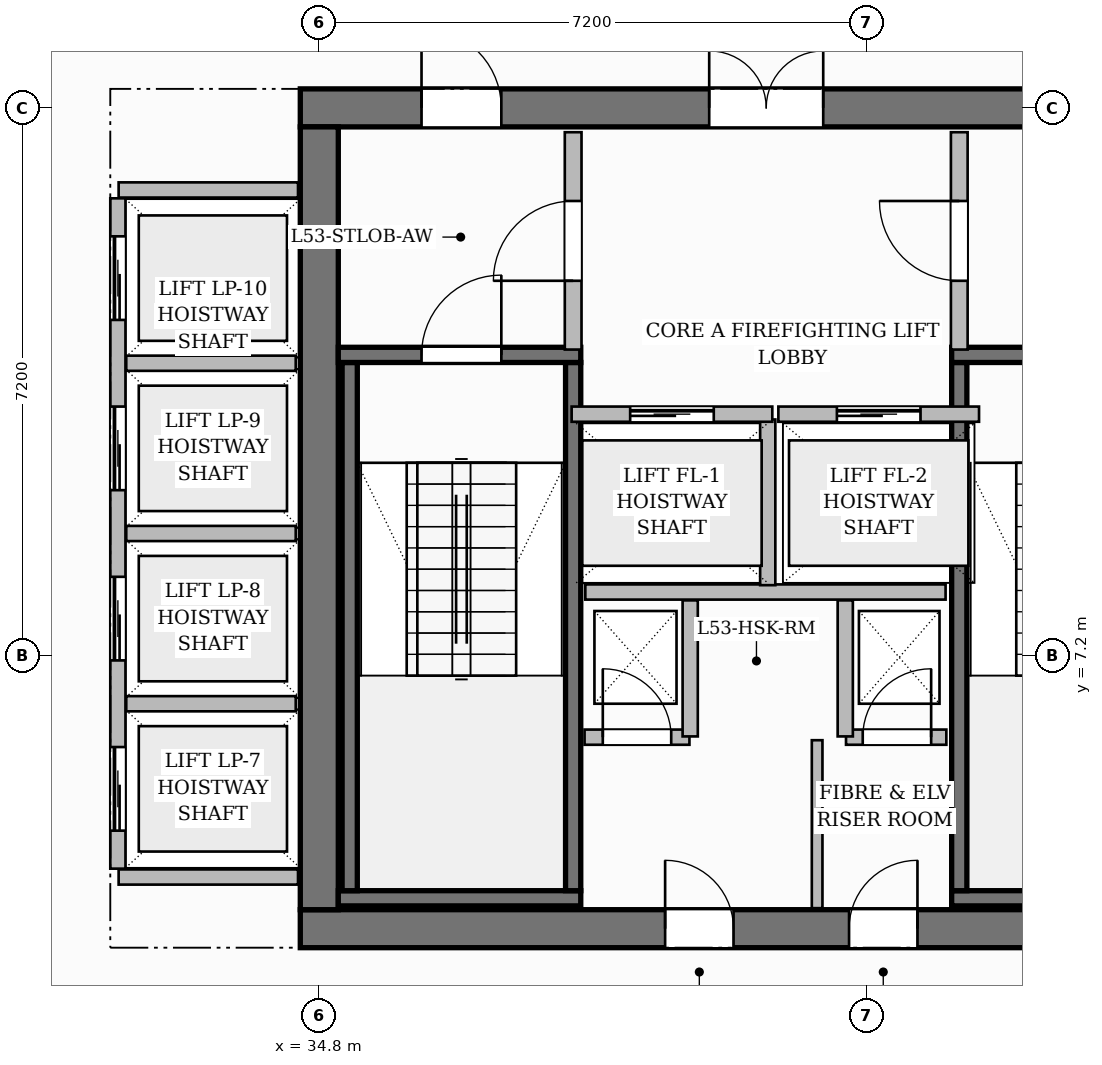
"""IFC4 building model, lengths in metres.
Left out: names, types, materials, properties, quantities, classifications, styles, units other than length and angle.
Written with IfcOpenShell. Run it as: python <this file> out.ifc"""

import sys

from ifc_helpers import new_model, si_unit, direction, frame, frame_2d, origin, place, context, subcontext, project, spatial, rectangle, extrude, source, transform, mapped, element, fill, save


model = new_model("IFC4")
c1 = context("Model", 3, precision=1e-05, world=origin(), true_north=direction((0.0, 1.0)))
c2 = subcontext(c1, "Body", "Model", "MODEL_VIEW")
j1 = project(units=[si_unit("LENGTHUNIT", "METRE"), si_unit("PLANEANGLEUNIT", "RADIAN")], contexts=[c1])
p1 = place(None, origin())
s1 = spatial("IfcSite", under=j1, at=p1, CompositionType="ELEMENT")
p2 = place(p1, origin())
s2 = spatial("IfcBuilding", under=s1, at=p2, CompositionType="ELEMENT")
p3 = place(p2, frame((0.0, 0.0, 213.45)))
s3 = spatial("IfcBuildingStorey", under=s2, at=p3, CompositionType="ELEMENT", Elevation=213.45)
p4 = place(p3, frame((34.55, 3.6, 0.0), z_axis=(0.0, 0.0, 1.0), x_axis=(1.0, 0.0, 0.0)))
e1 = element("IfcWall", 1, at=p4, inside=s3, PredefinedType="SHEAR", context=c2, shape_type="SweptSolid", body=[
    extrude(rectangle(XDim=15.5, YDim=0.5, at=frame_2d((7.75, 0.0))), origin(), (0.0, 0.0, 1.0), 3.85),
])
p5 = place(p4, frame((4.8, 0.0, 0.0)))
e2 = element("IfcOpeningElement", 2, at=p5, cuts=e1, PredefinedType="OPENING", context=c2, shape_type="SweptSolid", body=[
    extrude(rectangle(XDim=0.9, YDim=2.1, at=frame_2d((0.45, 1.05))), frame((0.0, 0.26, 0.0), z_axis=(0.0, -1.0, 0.0), x_axis=(1.0, 0.0, 0.0)), (0.0, 0.0, 1.0), 0.52),
])
p6 = place(p4, frame((7.22, 0.0, 0.0)))
e3 = element("IfcOpeningElement", 3, at=p6, cuts=e1, PredefinedType="OPENING", context=c2, shape_type="SweptSolid", body=[
    extrude(rectangle(XDim=0.9, YDim=2.1, at=frame_2d((0.45, 1.05))), frame((0.0, 0.26, 0.0), z_axis=(0.0, -1.0, 0.0), x_axis=(1.0, 0.0, 0.0)), (0.0, 0.0, 1.0), 0.52),
])
p7 = place(p3, frame((34.55, 14.4, 0.0), z_axis=(0.0, 0.0, 1.0), x_axis=(1.0, 0.0, 0.0)))
e4 = element("IfcWall", 4, at=p7, inside=s3, PredefinedType="SHEAR", context=c2, shape_type="SweptSolid", body=[
    extrude(rectangle(XDim=15.5, YDim=0.5, at=frame_2d((7.75, 0.0))), origin(), (0.0, 0.0, 1.0), 3.85),
])
p8 = place(p7, frame((5.38, 0.0, 0.0)))
e5 = element("IfcOpeningElement", 5, at=p8, cuts=e4, PredefinedType="OPENING", context=c2, shape_type="SweptSolid", body=[
    extrude(rectangle(XDim=1.5, YDim=2.2, at=frame_2d((0.75, 1.1))), frame((0.0, 0.26, 0.0), z_axis=(0.0, -1.0, 0.0), x_axis=(1.0, 0.0, 0.0)), (0.0, 0.0, 1.0), 0.52),
])
p9 = place(p7, frame((1.595, 0.0, 0.0)))
e6 = element("IfcOpeningElement", 6, at=p9, cuts=e4, PredefinedType="OPENING", context=c2, shape_type="SweptSolid", body=[
    extrude(rectangle(XDim=1.05, YDim=2.15, at=frame_2d((0.525, 1.075))), frame((0.0, 0.26, 0.0), z_axis=(0.0, -1.0, 0.0), x_axis=(1.0, 0.0, 0.0)), (0.0, 0.0, 1.0), 0.52),
])
p10 = place(p7, frame((11.225, 0.0, 0.0)))
e7 = element("IfcOpeningElement", 7, at=p10, cuts=e4, PredefinedType="OPENING", context=c2, shape_type="SweptSolid", body=[
    extrude(rectangle(XDim=1.05, YDim=2.15, at=frame_2d((0.525, 1.075))), frame((0.0, 0.26, 0.0), z_axis=(0.0, -1.0, 0.0), x_axis=(1.0, 0.0, 0.0)), (0.0, 0.0, 1.0), 0.52),
])
p11 = place(p3, frame((34.8, 3.85, 0.0), z_axis=(0.0, 0.0, 1.0), x_axis=(0.0, 1.0, 0.0)))
e8 = element("IfcWall", 8, at=p11, inside=s3, PredefinedType="SHEAR", context=c2, shape_type="SweptSolid", body=[
    extrude(rectangle(XDim=10.3, YDim=0.5, at=frame_2d((5.15, 0.0))), origin(), (0.0, 0.0, 1.0), 3.85),
])
p12 = place(p3, frame((35.05, 4.0, 0.0), z_axis=(0.0, 0.0, 1.0), x_axis=(1.0, 0.0, 0.0)))
e9 = element("IfcWall", 9, at=p12, inside=s3, PredefinedType="SHEAR", context=c2, shape_type="SweptSolid", body=[
    extrude(rectangle(XDim=3.19, YDim=0.2, at=frame_2d((1.595, 0.0))), origin(), (0.0, 0.0, 1.0), 3.85),
])
for number, where, z_axis, x_axis in (
    (10, (35.2, 4.1, 0.0), (0.0, 0.0, 1.0), (0.0, 1.0, 0.0)),
    (11, (38.14, 4.1, 0.0), (0.0, 0.0, 1.0), (0.0, 1.0, 0.0)),
):
    element("IfcWall", number, at=place(p3, frame(where, z_axis=z_axis, x_axis=x_axis)), inside=s3, PredefinedType="SHEAR", context=c2, shape_type="SweptSolid", body=[
        extrude(rectangle(XDim=6.95, YDim=0.2, at=frame_2d((3.475, 0.0))), origin(), (0.0, 0.0, 1.0), 3.85),
    ])
p13 = place(p3, frame((35.05, 11.15, 0.0), z_axis=(0.0, 0.0, 1.0), x_axis=(1.0, 0.0, 0.0)))
e12 = element("IfcWall", 12, at=p13, inside=s3, PredefinedType="SHEAR", context=c2, shape_type="SweptSolid", body=[
    extrude(rectangle(XDim=3.19, YDim=0.2, at=frame_2d((1.595, 0.0))), origin(), (0.0, 0.0, 1.0), 3.85),
])
p14 = place(p13, frame((1.095, 0.0, 0.0)))
e13 = element("IfcOpeningElement", 13, at=p14, cuts=e12, PredefinedType="OPENING", context=c2, shape_type="SweptSolid", body=[
    extrude(rectangle(XDim=1.05, YDim=2.2, at=frame_2d((0.525, 1.1))), frame((0.0, 0.11, 0.0), z_axis=(0.0, -1.0, 0.0), x_axis=(1.0, 0.0, 0.0)), (0.0, 0.0, 1.0), 0.22),
])
p15 = place(p3, frame((43.12, 4.0, 0.0), z_axis=(0.0, 0.0, 1.0), x_axis=(1.0, 0.0, 0.0)))
e14 = element("IfcWall", 14, at=p15, inside=s3, PredefinedType="SHEAR", context=c2, shape_type="SweptSolid", body=[
    extrude(rectangle(XDim=6.43, YDim=0.2, at=frame_2d((3.215, 0.0))), origin(), (0.0, 0.0, 1.0), 3.85),
])
p16 = place(p3, frame((43.22, 4.1, 0.0), z_axis=(0.0, 0.0, 1.0), x_axis=(0.0, 1.0, 0.0)))
e15 = element("IfcWall", 15, at=p16, inside=s3, PredefinedType="SHEAR", context=c2, shape_type="SweptSolid", body=[
    extrude(rectangle(XDim=6.95, YDim=0.2, at=frame_2d((3.475, 0.0))), origin(), (0.0, 0.0, 1.0), 3.85),
])
p17 = place(p3, frame((43.12, 11.15, 0.0), z_axis=(0.0, 0.0, 1.0), x_axis=(1.0, 0.0, 0.0)))
e16 = element("IfcWall", 16, at=p17, inside=s3, PredefinedType="SHEAR", context=c2, shape_type="SweptSolid", body=[
    extrude(rectangle(XDim=6.43, YDim=0.2, at=frame_2d((3.215, 0.0))), origin(), (0.0, 0.0, 1.0), 3.85),
])
p18 = place(p17, frame((1.045, 0.0, 0.0)))
e17 = element("IfcOpeningElement", 17, at=p18, cuts=e16, PredefinedType="OPENING", context=c2, shape_type="SweptSolid", body=[
    extrude(rectangle(XDim=1.05, YDim=2.2, at=frame_2d((0.525, 1.1))), frame((0.0, 0.11, 0.0), z_axis=(0.0, -1.0, 0.0), x_axis=(1.0, 0.0, 0.0)), (0.0, 0.0, 1.0), 0.22),
])
p19 = place(p17, frame((4.125, 0.0, 0.0)))
e18 = element("IfcOpeningElement", 18, at=p19, cuts=e16, PredefinedType="OPENING", context=c2, shape_type="SweptSolid", body=[
    extrude(rectangle(XDim=1.05, YDim=2.2, at=frame_2d((0.525, 1.1))), frame((0.0, 0.11, 0.0), z_axis=(0.0, -1.0, 0.0), x_axis=(1.0, 0.0, 0.0)), (0.0, 0.0, 1.0), 0.22),
])
p20 = place(p3, frame((38.3, 8.03, 0.0), z_axis=(0.0, 0.0, 1.0), x_axis=(1.0, 0.0, 0.0)))
e19 = element("IfcWall", 19, at=p20, inside=s3, PredefinedType="PARTITIONING", context=c2, shape_type="SweptSolid", body=[
    extrude(rectangle(XDim=4.74, YDim=0.2, at=frame_2d((2.37, 0.0))), origin(), (0.0, 0.0, 1.0), 3.6),
])
p21 = place(p3, frame((40.7, 8.12, 0.0), z_axis=(0.0, 0.0, 1.0), x_axis=(0.0, 1.0, 0.0)))
e20 = element("IfcWall", 20, at=p21, inside=s3, PredefinedType="PARTITIONING", context=c2, shape_type="SweptSolid", body=[
    extrude(rectangle(XDim=2.18, YDim=0.2, at=frame_2d((1.09, 0.0))), origin(), (0.0, 0.0, 1.0), 3.6),
])
p22 = place(p3, frame((38.14, 11.22, 0.0), z_axis=(0.0, 0.0, 1.0), x_axis=(0.0, 1.0, 0.0)))
e21 = element("IfcWall", 21, at=p22, inside=s3, PredefinedType="PARTITIONING", context=c2, shape_type="SweptSolid", body=[
    extrude(rectangle(XDim=2.86, YDim=0.22, at=frame_2d((1.43, 0.0))), origin(), (0.0, 0.0, 1.0), 3.6),
])
p23 = place(p22, frame((0.905, 0.0, 0.0)))
e22 = element("IfcOpeningElement", 22, at=p23, cuts=e21, PredefinedType="OPENING", context=c2, shape_type="SweptSolid", body=[
    extrude(rectangle(XDim=1.05, YDim=2.15, at=frame_2d((0.525, 1.075))), frame((0.0, 0.12, 0.0), z_axis=(0.0, -1.0, 0.0), x_axis=(1.0, 0.0, 0.0)), (0.0, 0.0, 1.0), 0.24),
])
p24 = place(p3, frame((43.22, 11.22, 0.0), z_axis=(0.0, 0.0, 1.0), x_axis=(0.0, 1.0, 0.0)))
e23 = element("IfcWall", 23, at=p24, inside=s3, PredefinedType="PARTITIONING", context=c2, shape_type="SweptSolid", body=[
    extrude(rectangle(XDim=2.86, YDim=0.22, at=frame_2d((1.43, 0.0))), origin(), (0.0, 0.0, 1.0), 3.6),
])
p25 = place(p24, frame((0.905, 0.0, 0.0)))
e24 = element("IfcOpeningElement", 24, at=p25, cuts=e23, PredefinedType="OPENING", context=c2, shape_type="SweptSolid", body=[
    extrude(rectangle(XDim=1.05, YDim=2.15, at=frame_2d((0.525, 1.075))), frame((0.0, 0.12, 0.0), z_axis=(0.0, -1.0, 0.0), x_axis=(1.0, 0.0, 0.0)), (0.0, 0.0, 1.0), 0.24),
])
p26 = place(p3, frame((38.29, 6.12, 0.0), z_axis=(0.0, 0.0, 1.0), x_axis=(1.0, 0.0, 0.0)))
e25 = element("IfcWall", 25, at=p26, inside=s3, PredefinedType="PARTITIONING", context=c2, shape_type="SweptSolid", body=[
    extrude(rectangle(XDim=1.38, YDim=0.2, at=frame_2d((0.69, 0.0))), origin(), (0.0, 0.0, 1.0), 3.6),
])
p27 = place(p26, frame((0.24, 0.0, 0.0)))
e26 = element("IfcOpeningElement", 26, at=p27, cuts=e25, PredefinedType="OPENING", context=c2, shape_type="SweptSolid", body=[
    extrude(rectangle(XDim=0.9, YDim=2.1, at=frame_2d((0.45, 1.05))), frame((0.0, 0.11, 0.0), z_axis=(0.0, -1.0, 0.0), x_axis=(1.0, 0.0, 0.0)), (0.0, 0.0, 1.0), 0.22),
])
p28 = place(p3, frame((39.68, 6.13, 0.0), z_axis=(0.0, 0.0, 1.0), x_axis=(0.0, 1.0, 0.0)))
e27 = element("IfcWall", 27, at=p28, inside=s3, PredefinedType="PARTITIONING", context=c2, shape_type="SweptSolid", body=[
    extrude(rectangle(XDim=1.79, YDim=0.2, at=frame_2d((0.895, 0.0))), origin(), (0.0, 0.0, 1.0), 3.6),
])
p29 = place(p3, frame((41.73, 6.12, 0.0), z_axis=(0.0, 0.0, 1.0), x_axis=(1.0, 0.0, 0.0)))
e28 = element("IfcWall", 28, at=p29, inside=s3, PredefinedType="PARTITIONING", context=c2, shape_type="SweptSolid", body=[
    extrude(rectangle(XDim=1.32, YDim=0.2, at=frame_2d((0.66, 0.0))), origin(), (0.0, 0.0, 1.0), 3.6),
])
p30 = place(p29, frame((0.22, 0.0, 0.0)))
e29 = element("IfcOpeningElement", 29, at=p30, cuts=e28, PredefinedType="OPENING", context=c2, shape_type="SweptSolid", body=[
    extrude(rectangle(XDim=0.9, YDim=2.1, at=frame_2d((0.45, 1.05))), frame((0.0, 0.11, 0.0), z_axis=(0.0, -1.0, 0.0), x_axis=(1.0, 0.0, 0.0)), (0.0, 0.0, 1.0), 0.22),
])
p31 = place(p3, frame((41.72, 6.13, 0.0), z_axis=(0.0, 0.0, 1.0), x_axis=(0.0, 1.0, 0.0)))
e30 = element("IfcWall", 30, at=p31, inside=s3, PredefinedType="PARTITIONING", context=c2, shape_type="SweptSolid", body=[
    extrude(rectangle(XDim=1.79, YDim=0.2, at=frame_2d((0.895, 0.0))), origin(), (0.0, 0.0, 1.0), 3.6),
])
p32 = place(p3, frame((41.35, 3.87, 0.0), z_axis=(0.0, 0.0, 1.0), x_axis=(0.0, 1.0, 0.0)))
e31 = element("IfcWall", 31, at=p32, inside=s3, PredefinedType="PARTITIONING", context=c2, shape_type="SweptSolid", body=[
    extrude(rectangle(XDim=2.21, YDim=0.14, at=frame_2d((1.105, 0.0))), origin(), (0.0, 0.0, 1.0), 3.6),
])
for number, where, z_axis, x_axis in (
    (32, (32.16, 4.28, 0.0), (0.0, 0.0, 1.0), (1.0, 0.0, 0.0)),
    (33, (32.16, 13.32, 0.0), (0.0, 0.0, 1.0), (1.0, 0.0, 0.0)),
):
    element("IfcWall", number, at=place(p3, frame(where, z_axis=z_axis, x_axis=x_axis)), inside=s3, PredefinedType="PARTITIONING", context=c2, shape_type="SweptSolid", body=[
        extrude(rectangle(XDim=2.36, YDim=0.2, at=frame_2d((1.18, 0.0))), origin(), (0.0, 0.0, 1.0), 3.6),
    ])
p33 = place(p3, frame((32.15, 4.39, 0.0), z_axis=(0.0, 0.0, 1.0), x_axis=(0.0, 1.0, 0.0)))
e34 = element("IfcWall", 34, at=p33, inside=s3, PredefinedType="PARTITIONING", context=c2, shape_type="SweptSolid", body=[
    extrude(rectangle(XDim=8.82, YDim=0.2, at=frame_2d((4.41, 0.0))), origin(), (0.0, 0.0, 1.0), 3.6),
])
p34 = place(p33, frame((0.5, 0.0, 0.0)))
e35 = element("IfcOpeningElement", 35, at=p34, cuts=e34, PredefinedType="OPENING", context=c2, shape_type="SweptSolid", body=[
    extrude(rectangle(XDim=1.1, YDim=2.2, at=frame_2d((0.55, 1.1))), frame((0.0, 0.11, 0.0), z_axis=(0.0, -1.0, 0.0), x_axis=(1.0, 0.0, 0.0)), (0.0, 0.0, 1.0), 0.22),
])
p35 = place(p33, frame((2.74, 0.0, 0.0)))
e36 = element("IfcOpeningElement", 36, at=p35, cuts=e34, PredefinedType="OPENING", context=c2, shape_type="SweptSolid", body=[
    extrude(rectangle(XDim=1.1, YDim=2.2, at=frame_2d((0.55, 1.1))), frame((0.0, 0.11, 0.0), z_axis=(0.0, -1.0, 0.0), x_axis=(1.0, 0.0, 0.0)), (0.0, 0.0, 1.0), 0.22),
])
p36 = place(p33, frame((4.98, 0.0, 0.0)))
e37 = element("IfcOpeningElement", 37, at=p36, cuts=e34, PredefinedType="OPENING", context=c2, shape_type="SweptSolid", body=[
    extrude(rectangle(XDim=1.1, YDim=2.2, at=frame_2d((0.55, 1.1))), frame((0.0, 0.11, 0.0), z_axis=(0.0, -1.0, 0.0), x_axis=(1.0, 0.0, 0.0)), (0.0, 0.0, 1.0), 0.22),
])
p37 = place(p33, frame((7.22, 0.0, 0.0)))
e38 = element("IfcOpeningElement", 38, at=p37, cuts=e34, PredefinedType="OPENING", context=c2, shape_type="SweptSolid", body=[
    extrude(rectangle(XDim=1.1, YDim=2.2, at=frame_2d((0.55, 1.1))), frame((0.0, 0.11, 0.0), z_axis=(0.0, -1.0, 0.0), x_axis=(1.0, 0.0, 0.0)), (0.0, 0.0, 1.0), 0.22),
])
for number, where, z_axis, x_axis in (
    (39, (32.26, 6.56, 0.0), (0.0, 0.0, 1.0), (1.0, 0.0, 0.0)),
    (40, (32.26, 8.8, 0.0), (0.0, 0.0, 1.0), (1.0, 0.0, 0.0)),
    (41, (32.26, 11.04, 0.0), (0.0, 0.0, 1.0), (1.0, 0.0, 0.0)),
):
    element("IfcWall", number, at=place(p3, frame(where, z_axis=z_axis, x_axis=x_axis)), inside=s3, PredefinedType="PARTITIONING", context=c2, shape_type="SweptSolid", body=[
        extrude(rectangle(XDim=2.23, YDim=0.2, at=frame_2d((1.115, 0.0))), origin(), (0.0, 0.0, 1.0), 3.6),
    ])
p38 = place(p3, frame((38.12, 10.37, 0.0), z_axis=(0.0, 0.0, 1.0), x_axis=(1.0, 0.0, 0.0)))
e42 = element("IfcWall", 42, at=p38, inside=s3, PredefinedType="PARTITIONING", context=c2, shape_type="SweptSolid", body=[
    extrude(rectangle(XDim=2.64, YDim=0.2, at=frame_2d((1.32, 0.0))), origin(), (0.0, 0.0, 1.0), 3.6),
])
p39 = place(p38, frame((0.77, 0.0, 0.0)))
e43 = element("IfcOpeningElement", 43, at=p39, cuts=e42, PredefinedType="OPENING", context=c2, shape_type="SweptSolid", body=[
    extrude(rectangle(XDim=1.1, YDim=2.2, at=frame_2d((0.55, 1.1))), frame((0.0, 0.11, 0.0), z_axis=(0.0, -1.0, 0.0), x_axis=(1.0, 0.0, 0.0)), (0.0, 0.0, 1.0), 0.22),
])
p40 = place(p3, frame((40.84, 10.37, 0.0), z_axis=(0.0, 0.0, 1.0), x_axis=(1.0, 0.0, 0.0)))
e44 = element("IfcWall", 44, at=p40, inside=s3, PredefinedType="PARTITIONING", context=c2, shape_type="SweptSolid", body=[
    extrude(rectangle(XDim=2.64, YDim=0.2, at=frame_2d((1.32, 0.0))), origin(), (0.0, 0.0, 1.0), 3.6),
])
p41 = place(p40, frame((0.77, 0.0, 0.0)))
e45 = element("IfcOpeningElement", 45, at=p41, cuts=e44, PredefinedType="OPENING", context=c2, shape_type="SweptSolid", body=[
    extrude(rectangle(XDim=1.1, YDim=2.2, at=frame_2d((0.55, 1.1))), frame((0.0, 0.11, 0.0), z_axis=(0.0, -1.0, 0.0), x_axis=(1.0, 0.0, 0.0)), (0.0, 0.0, 1.0), 0.22),
])
m1 = source(origin(), c2, "Body", "SweptSolid", [
    extrude(rectangle(XDim=1.05, YDim=2.2, at=frame_2d((0.525, 1.1))), frame((0.0, 0.025, 0.0), z_axis=(0.0, -1.0, 0.0), x_axis=(1.0, 0.0, 0.0)), (0.0, 0.0, 1.0), 0.05),
])
p42 = place(p14, origin())
e46 = element("IfcDoor", 46, at=p42, inside=s3, OperationType="SINGLE_SWING_RIGHT", PredefinedType="DOOR", context=c2, shape_type="MappedRepresentation", body=[
    mapped(m1, transform((0.0, 0.0, 0.0), scale=1.0)),
])
fill(e13, e46)
m2 = source(origin(), c2, "Body", "SweptSolid", [
    extrude(rectangle(XDim=1.05, YDim=2.15, at=frame_2d((0.525, 1.075))), frame((0.0, 0.025, 0.0), z_axis=(0.0, -1.0, 0.0), x_axis=(1.0, 0.0, 0.0)), (0.0, 0.0, 1.0), 0.05),
])
p43 = place(p23, origin())
e47 = element("IfcDoor", 47, at=p43, inside=s3, OperationType="SINGLE_SWING_LEFT", PredefinedType="DOOR", context=c2, shape_type="MappedRepresentation", body=[
    mapped(m2, transform((0.0, 0.0, 0.0), scale=1.0)),
])
fill(e22, e47)
p44 = place(p25, origin())
e48 = element("IfcDoor", 48, at=p44, inside=s3, OperationType="SINGLE_SWING_RIGHT", PredefinedType="DOOR", context=c2, shape_type="MappedRepresentation", body=[
    mapped(m2, transform((0.0, 0.0, 0.0), scale=1.0)),
])
fill(e24, e48)
m3 = source(origin(), c2, "Body", "SweptSolid", [
    extrude(rectangle(XDim=1.5, YDim=2.2, at=frame_2d((0.75, 1.1))), frame((0.0, 0.025, 0.0), z_axis=(0.0, -1.0, 0.0), x_axis=(1.0, 0.0, 0.0)), (0.0, 0.0, 1.0), 0.05),
])
p45 = place(p8, origin())
e49 = element("IfcDoor", 49, at=p45, inside=s3, OperationType="DOUBLE_DOOR_SINGLE_SWING", PredefinedType="DOOR", context=c2, shape_type="MappedRepresentation", body=[
    mapped(m3, transform((0.0, 0.0, 0.0), scale=1.0)),
])
fill(e5, e49)
p46 = place(p9, origin())
e50 = element("IfcDoor", 50, at=p46, inside=s3, OperationType="SINGLE_SWING_LEFT", PredefinedType="DOOR", context=c2, shape_type="MappedRepresentation", body=[
    mapped(m2, transform((0.0, 0.0, 0.0), scale=1.0)),
])
fill(e6, e50)
m4 = source(origin(), c2, "Body", "SweptSolid", [
    extrude(rectangle(XDim=0.9, YDim=2.1, at=frame_2d((0.45, 1.05))), frame((0.0, 0.025, 0.0), z_axis=(0.0, -1.0, 0.0), x_axis=(1.0, 0.0, 0.0)), (0.0, 0.0, 1.0), 0.05),
])
p47 = place(p27, origin())
e51 = element("IfcDoor", 51, at=p47, inside=s3, OperationType="SINGLE_SWING_LEFT", PredefinedType="DOOR", context=c2, shape_type="MappedRepresentation", body=[
    mapped(m4, transform((0.0, 0.0, 0.0), scale=1.0)),
])
fill(e26, e51)
p48 = place(p30, origin())
e52 = element("IfcDoor", 52, at=p48, inside=s3, OperationType="SINGLE_SWING_RIGHT", PredefinedType="DOOR", context=c2, shape_type="MappedRepresentation", body=[
    mapped(m4, transform((0.0, 0.0, 0.0), scale=1.0)),
])
fill(e29, e52)
p49 = place(p5, origin())
e53 = element("IfcDoor", 53, at=p49, inside=s3, OperationType="SINGLE_SWING_LEFT", PredefinedType="DOOR", context=c2, shape_type="MappedRepresentation", body=[
    mapped(m4, transform((0.0, 0.0, 0.0), scale=1.0)),
])
fill(e2, e53)
p50 = place(p6, origin())
e54 = element("IfcDoor", 54, at=p50, inside=s3, OperationType="SINGLE_SWING_RIGHT", PredefinedType="DOOR", context=c2, shape_type="MappedRepresentation", body=[
    mapped(m4, transform((0.0, 0.0, 0.0), scale=1.0)),
])
fill(e3, e54)
m5 = source(origin(), c2, "Body", "SweptSolid", [
    extrude(rectangle(XDim=1.1, YDim=2.2, at=frame_2d((0.55, 1.1))), frame((0.0, 0.025, 0.0), z_axis=(0.0, -1.0, 0.0), x_axis=(1.0, 0.0, 0.0)), (0.0, 0.0, 1.0), 0.05),
])
p51 = place(p39, origin())
e55 = element("IfcDoor", 55, at=p51, inside=s3, OperationType="SLIDING_TO_LEFT", PredefinedType="DOOR", context=c2, shape_type="MappedRepresentation", body=[
    mapped(m5, transform((0.0, 0.0, 0.0), scale=1.0)),
])
fill(e43, e55)
p52 = place(p41, origin())
e56 = element("IfcDoor", 56, at=p52, inside=s3, OperationType="SLIDING_TO_LEFT", PredefinedType="DOOR", context=c2, shape_type="MappedRepresentation", body=[
    mapped(m5, transform((0.0, 0.0, 0.0), scale=1.0)),
])
fill(e45, e56)
p53 = place(p34, origin())
e57 = element("IfcDoor", 57, at=p53, inside=s3, OperationType="SLIDING_TO_LEFT", PredefinedType="DOOR", context=c2, shape_type="MappedRepresentation", body=[
    mapped(m5, transform((0.0, 0.0, 0.0), scale=1.0)),
])
fill(e35, e57)
p54 = place(p35, origin())
e58 = element("IfcDoor", 58, at=p54, inside=s3, OperationType="SLIDING_TO_LEFT", PredefinedType="DOOR", context=c2, shape_type="MappedRepresentation", body=[
    mapped(m5, transform((0.0, 0.0, 0.0), scale=1.0)),
])
fill(e36, e58)
p55 = place(p36, origin())
e59 = element("IfcDoor", 59, at=p55, inside=s3, OperationType="SLIDING_TO_LEFT", PredefinedType="DOOR", context=c2, shape_type="MappedRepresentation", body=[
    mapped(m5, transform((0.0, 0.0, 0.0), scale=1.0)),
])
fill(e37, e59)
p56 = place(p37, origin())
e60 = element("IfcDoor", 60, at=p56, inside=s3, OperationType="SLIDING_TO_LEFT", PredefinedType="DOOR", context=c2, shape_type="MappedRepresentation", body=[
    mapped(m5, transform((0.0, 0.0, 0.0), scale=1.0)),
])
fill(e38, e60)
save(model, sys.argv[1])
